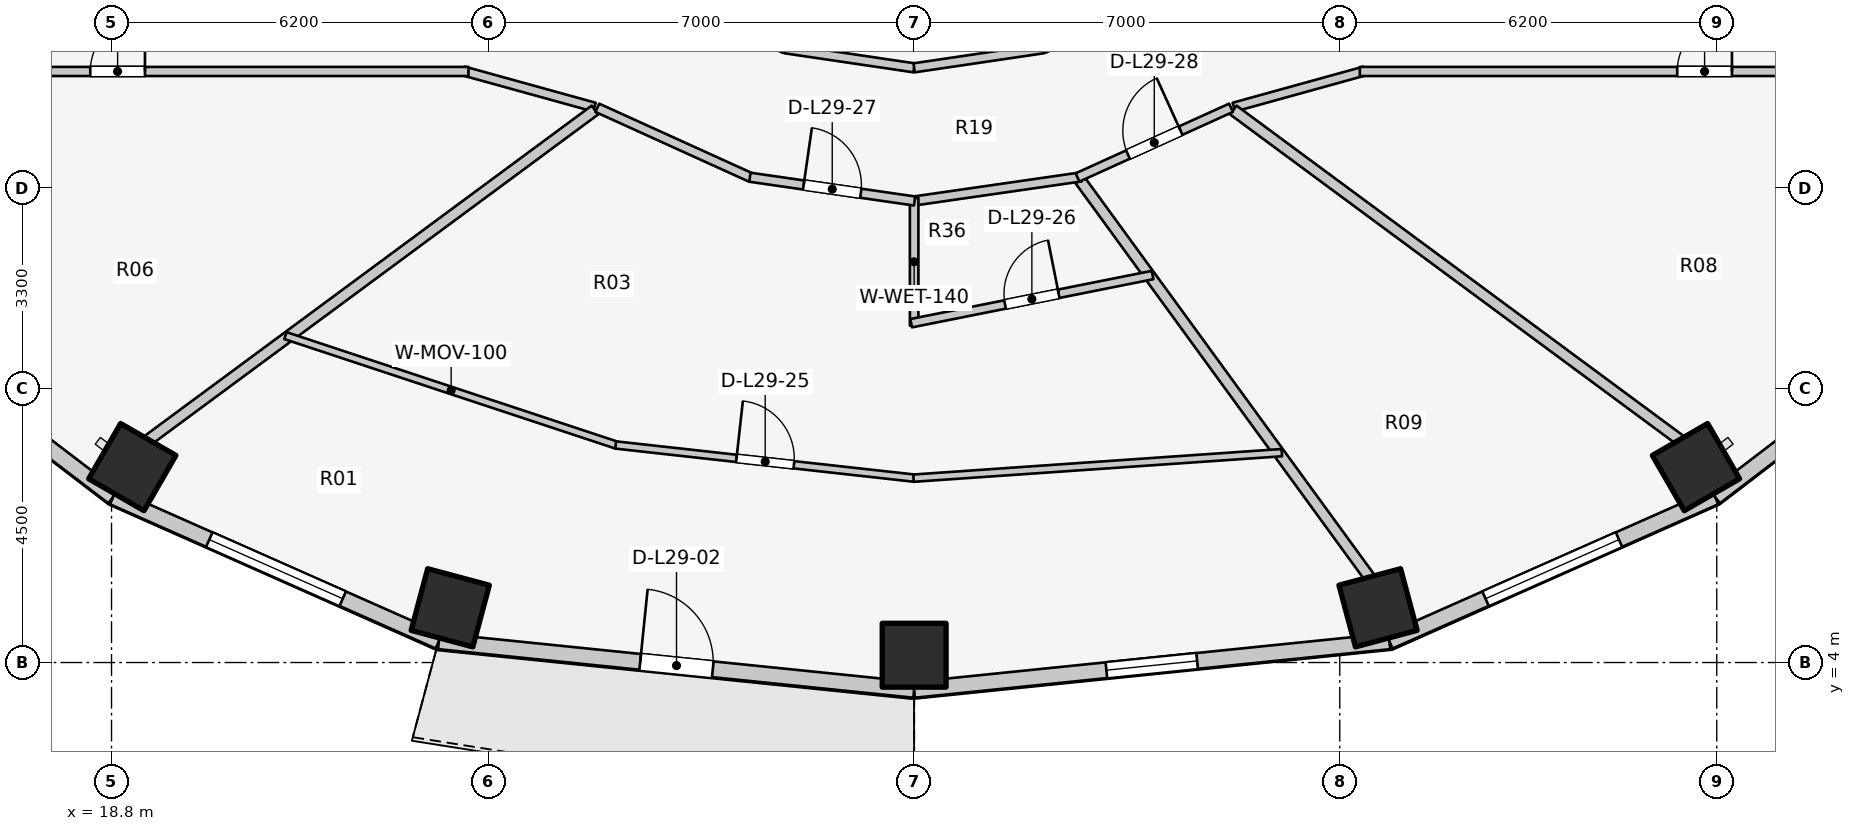
"""IFC4 building model, lengths in metres.
Left out: names, types, materials, properties, quantities, classifications, styles, units other than length and angle.
Written with IfcOpenShell. Run it as: python <this file> out.ifc"""

import sys

from ifc_helpers import new_model, si_unit, direction, frame, frame_2d, origin, origin_2d, place, context, subcontext, project, spatial, rectangle, extrude, element, fill, save


model = new_model("IFC4")
c1 = context("Model", 3, precision=1e-05, world=origin(), true_north=direction((0.0, 1.0)))
c2 = subcontext(c1, "Body", "Model", "MODEL_VIEW")
j1 = project(units=[si_unit("LENGTHUNIT", "METRE"), si_unit("PLANEANGLEUNIT", "RADIAN")], contexts=[c1])
p1 = place(None, origin())
s1 = spatial("IfcSite", under=j1, at=p1, CompositionType="ELEMENT")
p2 = place(p1, origin())
s2 = spatial("IfcBuilding", under=s1, at=p2, CompositionType="ELEMENT")
p3 = place(p2, frame((0.0, 0.0, 98.0)))
s3 = spatial("IfcBuildingStorey", under=s2, at=p3, CompositionType="ELEMENT", Elevation=98.0)
for number, where, z_axis, x_axis in (
    (1, (19.142, 7.214, 0.0), (0.0, 0.0, 1.0), (-0.5, -0.866, 0.0)),
    (2, (24.371, 4.9, 0.0), (0.0, 0.0, 1.0), (-0.259, -0.966, 0.0)),
    (3, (32.0, 4.12, 0.0), (0.0, 0.0, 1.0), (0.0, -1.0, 0.0)),
    (4, (39.629, 4.9, 0.0), (0.0, 0.0, 1.0), (0.259, -0.966, 0.0)),
    (5, (44.858, 7.214, 0.0), (0.0, 0.0, 1.0), (0.5, -0.866, 0.0)),
):
    element("IfcColumn", number, at=place(p3, frame(where, z_axis=z_axis, x_axis=x_axis)), inside=s3, PredefinedType="COLUMN", context=c2, shape_type="SweptSolid", body=[
        extrude(rectangle(XDim=1.05, YDim=1.05, at=origin_2d()), origin(), (0.0, 0.0, 1.0), 3.1),
    ])
p4 = place(p3, frame((14.734, 9.847, 0.0), z_axis=(0.0, 0.0, 1.0), x_axis=(0.794809810864, -0.606858603427, 0.0)))
e6 = element("IfcWall", 6, at=p4, inside=s3, PredefinedType="STANDARD", context=c2, shape_type="SweptSolid", body=[
    extrude(rectangle(XDim=5.149, YDim=0.26, at=frame_2d((2.575, 0.0))), origin(), (0.0, 0.0, 1.0), 2.85),
])
p5 = place(p3, frame((18.827, 6.722, 0.0), z_axis=(0.0, 0.0, 1.0), x_axis=(0.914336605747, -0.404955023911, 0.0)))
e7 = element("IfcWall", 7, at=p5, inside=s3, PredefinedType="STANDARD", context=c2, shape_type="SweptSolid", body=[
    extrude(rectangle(XDim=5.859, YDim=0.26, at=frame_2d((2.929, 0.0))), origin(), (0.0, 0.0, 1.0), 2.85),
])
p6 = place(p5, frame((1.729, 0.0, 0.75)))
e8 = element("IfcOpeningElement", 8, at=p6, cuts=e7, PredefinedType="OPENING", context=c2, shape_type="SweptSolid", body=[
    extrude(rectangle(XDim=2.4, YDim=1.7, at=frame_2d((1.2, 0.85))), frame((0.0, 0.14, 0.0), z_axis=(0.0, -1.0, 0.0), x_axis=(1.0, 0.0, 0.0)), (0.0, 0.0, 1.0), 0.28),
])
p7 = place(p3, frame((24.184, 4.349, 0.0), z_axis=(0.0, 0.0, 1.0), x_axis=(0.994821390558, -0.101638579726, 0.0)))
e9 = element("IfcWall", 9, at=p7, inside=s3, PredefinedType="STANDARD", context=c2, shape_type="SweptSolid", body=[
    extrude(rectangle(XDim=7.857, YDim=0.26, at=frame_2d((3.929, 0.0))), origin(), (0.0, 0.0, 1.0), 2.88),
])
p8 = place(p7, frame((3.329, 0.0, 0.0)))
e10 = element("IfcOpeningElement", 10, at=p8, cuts=e9, PredefinedType="OPENING", context=c2, shape_type="SweptSolid", body=[
    extrude(rectangle(XDim=1.2, YDim=2.2, at=frame_2d((0.6, 1.1))), frame((0.0, 0.14, 0.0), z_axis=(0.0, -1.0, 0.0), x_axis=(1.0, 0.0, 0.0)), (0.0, 0.0, 1.0), 0.28),
])
p9 = place(p3, frame((32.0, 3.551, 0.0), z_axis=(0.0, 0.0, 1.0), x_axis=(0.994821390558, 0.101638579726, 0.0)))
e11 = element("IfcWall", 11, at=p9, inside=s3, PredefinedType="STANDARD", context=c2, shape_type="SweptSolid", body=[
    extrude(rectangle(XDim=7.857, YDim=0.26, at=frame_2d((3.929, 0.0))), origin(), (0.0, 0.0, 1.0), 2.85),
])
p10 = place(p9, frame((3.178, 0.0, 0.75)))
e12 = element("IfcOpeningElement", 12, at=p10, cuts=e11, PredefinedType="OPENING", context=c2, shape_type="SweptSolid", body=[
    extrude(rectangle(XDim=1.5, YDim=1.6, at=frame_2d((0.75, 0.8))), frame((0.0, 0.14, 0.0), z_axis=(0.0, -1.0, 0.0), x_axis=(1.0, 0.0, 0.0)), (0.0, 0.0, 1.0), 0.28),
])
p11 = place(p3, frame((39.816, 4.349, 0.0), z_axis=(0.0, 0.0, 1.0), x_axis=(0.914336605747, 0.404955023911, 0.0)))
e13 = element("IfcWall", 13, at=p11, inside=s3, PredefinedType="STANDARD", context=c2, shape_type="SweptSolid", body=[
    extrude(rectangle(XDim=5.859, YDim=0.26, at=frame_2d((2.929, 0.0))), origin(), (0.0, 0.0, 1.0), 2.85),
])
p12 = place(p11, frame((1.729, 0.0, 0.75)))
e14 = element("IfcOpeningElement", 14, at=p12, cuts=e13, PredefinedType="OPENING", context=c2, shape_type="SweptSolid", body=[
    extrude(rectangle(XDim=2.4, YDim=1.7, at=frame_2d((1.2, 0.85))), frame((0.0, 0.14, 0.0), z_axis=(0.0, -1.0, 0.0), x_axis=(1.0, 0.0, 0.0)), (0.0, 0.0, 1.0), 0.28),
])
p13 = place(p3, frame((45.173, 6.722, 0.0), z_axis=(0.0, 0.0, 1.0), x_axis=(0.794809810864, 0.606858603427, 0.0)))
e15 = element("IfcWall", 15, at=p13, inside=s3, PredefinedType="STANDARD", context=c2, shape_type="SweptSolid", body=[
    extrude(rectangle(XDim=5.149, YDim=0.26, at=frame_2d((2.575, 0.0))), origin(), (0.0, 0.0, 1.0), 2.85),
])
p14 = place(p3, frame((27.89, 15.015, 0.0), z_axis=(0.0, 0.0, 1.0), x_axis=(0.906943449489, -0.421252393975, 0.0)))
e16 = element("IfcWall", 16, at=p14, inside=s3, PredefinedType="PARTITIONING", context=c2, shape_type="SweptSolid", body=[
    extrude(rectangle(XDim=2.186, YDim=0.15, at=frame_2d((1.093, 0.0))), origin(), (0.0, 0.0, 1.0), 2.272),
])
for number, where, z_axis, x_axis in (
    (17, (29.873, 14.094, 0.0), (0.0, 0.0, 1.0), (0.989, -0.146, 0.0)),
    (18, (32.0, 13.78, 0.0), (0.0, 0.0, 1.0), (0.989, 0.146, 0.0)),
):
    element("IfcWall", number, at=place(p3, frame(where, z_axis=z_axis, x_axis=x_axis)), inside=s3, PredefinedType="PARTITIONING", context=c2, shape_type="SweptSolid", body=[
        extrude(rectangle(XDim=2.151, YDim=0.15, at=frame_2d((1.075, 0.0))), origin(), (0.0, 0.0, 1.0), 2.272),
    ])
p15 = place(p3, frame((34.127, 14.094, 0.0), z_axis=(0.0, 0.0, 1.0), x_axis=(0.906943449489, 0.421252393975, 0.0)))
e19 = element("IfcWall", 19, at=p15, inside=s3, PredefinedType="PARTITIONING", context=c2, shape_type="SweptSolid", body=[
    extrude(rectangle(XDim=2.186, YDim=0.15, at=frame_2d((1.093, 0.0))), origin(), (0.0, 0.0, 1.0), 2.272),
])
p16 = place(p3, frame((26.742, 13.133, 0.0), z_axis=(0.0, 0.0, 1.0), x_axis=(-0.963833843713, 0.266503886865, 0.0)))
e20 = element("IfcWall", 20, at=p16, inside=s3, PredefinedType="PARTITIONING", context=c2, shape_type="SweptSolid", body=[
    extrude(rectangle(XDim=2.232, YDim=0.15, at=frame_2d((1.116, 0.0))), origin(), (0.0, 0.0, 1.0), 2.272),
])
p17 = place(p3, frame((17.15, 13.72, 0.0), z_axis=(0.0, 0.0, 1.0), x_axis=(1.0, 0.0, 0.0)))
e21 = element("IfcWall", 21, at=p17, inside=s3, PredefinedType="PARTITIONING", context=c2, shape_type="SweptSolid", body=[
    extrude(rectangle(XDim=7.52, YDim=0.15, at=frame_2d((3.76, 0.0))), origin(), (0.0, 0.0, 1.0), 2.272),
])
p18 = place(p17, frame((1.3, 0.0, 0.0)))
e22 = element("IfcOpeningElement", 22, at=p18, cuts=e21, PredefinedType="OPENING", context=c2, shape_type="SweptSolid", body=[
    extrude(rectangle(XDim=0.9, YDim=2.1, at=frame_2d((0.45, 1.05))), frame((0.0, 0.085, 0.0), z_axis=(0.0, -1.0, 0.0), x_axis=(1.0, 0.0, 0.0)), (0.0, 0.0, 1.0), 0.17),
])
p19 = place(p3, frame((37.258, 13.133, 0.0), z_axis=(0.0, 0.0, 1.0), x_axis=(0.963833843713, 0.266503886865, 0.0)))
e23 = element("IfcWall", 23, at=p19, inside=s3, PredefinedType="PARTITIONING", context=c2, shape_type="SweptSolid", body=[
    extrude(rectangle(XDim=2.232, YDim=0.15, at=frame_2d((1.116, 0.0))), origin(), (0.0, 0.0, 1.0), 2.272),
])
p20 = place(p3, frame((39.33, 13.72, 0.0), z_axis=(0.0, 0.0, 1.0), x_axis=(1.0, 0.0, 0.0)))
e24 = element("IfcWall", 24, at=p20, inside=s3, PredefinedType="PARTITIONING", context=c2, shape_type="SweptSolid", body=[
    extrude(rectangle(XDim=7.52, YDim=0.15, at=frame_2d((3.76, 0.0))), origin(), (0.0, 0.0, 1.0), 2.272),
])
p21 = place(p20, frame((5.22, 0.0, 0.0)))
e25 = element("IfcOpeningElement", 25, at=p21, cuts=e24, PredefinedType="OPENING", context=c2, shape_type="SweptSolid", body=[
    extrude(rectangle(XDim=0.9, YDim=2.1, at=frame_2d((0.45, 1.05))), frame((0.0, 0.085, 0.0), z_axis=(0.0, -1.0, 0.0), x_axis=(1.0, 0.0, 0.0)), (0.0, 0.0, 1.0), 0.17),
])
p22 = place(p3, frame((26.751, 13.086, 0.0), z_axis=(0.0, 0.0, 1.0), x_axis=(-0.80430981394, -0.594210167533, 0.0)))
e26 = element("IfcWall", 26, at=p22, inside=s3, PredefinedType="PARTITIONING", context=c2, shape_type="SweptSolid", body=[
    extrude(rectangle(XDim=9.146, YDim=0.18, at=frame_2d((4.573, 0.0))), origin(), (0.0, 0.0, 1.0), 2.272),
])
p23 = place(p3, frame((34.727, 11.934, 0.0), z_axis=(0.0, 0.0, 1.0), x_axis=(0.589042211476, -0.808102266486, 0.0)))
e27 = element("IfcWall", 27, at=p23, inside=s3, PredefinedType="PARTITIONING", context=c2, shape_type="SweptSolid", body=[
    extrude(rectangle(XDim=8.101, YDim=0.18, at=frame_2d((4.051, 0.0))), origin(), (0.0, 0.0, 1.0), 2.272),
])
p24 = place(p3, frame((37.249, 13.086, 0.0), z_axis=(0.0, 0.0, 1.0), x_axis=(0.80430981394, -0.594210167533, 0.0)))
e28 = element("IfcWall", 28, at=p24, inside=s3, PredefinedType="PARTITIONING", context=c2, shape_type="SweptSolid", body=[
    extrude(rectangle(XDim=9.146, YDim=0.18, at=frame_2d((4.573, 0.0))), origin(), (0.0, 0.0, 1.0), 2.272),
])
p25 = place(p3, frame((21.66, 9.376, 0.0), z_axis=(0.0, 0.0, 1.0), x_axis=(0.949429126756, -0.313981421852, 0.0)))
e29 = element("IfcWall", 29, at=p25, inside=s3, PredefinedType="MOVABLE", context=c2, shape_type="SweptSolid", body=[
    extrude(rectangle(XDim=5.741, YDim=0.12, at=frame_2d((2.87, 0.0))), origin(), (0.0, 0.0, 1.0), 2.272),
])
p26 = place(p3, frame((27.091, 7.578, 0.0), z_axis=(0.0, 0.0, 1.0), x_axis=(0.993892154322, -0.110355722898, 0.0)))
e30 = element("IfcWall", 30, at=p26, inside=s3, PredefinedType="MOVABLE", context=c2, shape_type="SweptSolid", body=[
    extrude(rectangle(XDim=4.949, YDim=0.12, at=frame_2d((2.475, 0.0))), origin(), (0.0, 0.0, 1.0), 2.272),
])
p27 = place(p26, frame((2.0, 0.0, 0.0)))
e31 = element("IfcOpeningElement", 31, at=p27, cuts=e30, PredefinedType="OPENING", context=c2, shape_type="SweptSolid", body=[
    extrude(rectangle(XDim=0.95, YDim=2.1, at=frame_2d((0.475, 1.05))), frame((0.0, 0.07, 0.0), z_axis=(0.0, -1.0, 0.0), x_axis=(1.0, 0.0, 0.0)), (0.0, 0.0, 1.0), 0.14),
])
p28 = place(p3, frame((31.99, 7.032, 0.0), z_axis=(0.0, 0.0, 1.0), x_axis=(0.997605327057, 0.06916365684, 0.0)))
e32 = element("IfcWall", 32, at=p28, inside=s3, PredefinedType="MOVABLE", context=c2, shape_type="SweptSolid", body=[
    extrude(rectangle(XDim=6.072, YDim=0.12, at=frame_2d((3.036, 0.0))), origin(), (0.0, 0.0, 1.0), 2.272),
])
p29 = place(p3, frame((31.95, 11.583, 0.0), z_axis=(0.0, 0.0, 1.0), x_axis=(0.989761784218, 0.142729150844, 0.0)))
e33 = element("IfcWall", 33, at=p29, inside=s3, PredefinedType="PARTITIONING", context=c2, shape_type="SweptSolid", body=[
    extrude(rectangle(XDim=2.822, YDim=0.15, at=frame_2d((1.411, 0.0))), origin(), (0.0, 0.0, 1.0), 2.272),
])
p30 = place(p3, frame((32.0, 11.64, 0.0), z_axis=(0.0, 0.0, 1.0), x_axis=(0.0, -1.0, 0.0)))
e34 = element("IfcWall", 34, at=p30, inside=s3, PredefinedType="PLUMBINGWALL", context=c2, shape_type="SweptSolid", body=[
    extrude(rectangle(XDim=2.1, YDim=0.14, at=frame_2d((1.05, 0.0))), origin(), (0.0, 0.0, 1.0), 2.272),
])
p31 = place(p3, frame((31.951, 9.58, 0.0), z_axis=(0.0, 0.0, 1.0), x_axis=(0.980668708329, 0.195675457082, 0.0)))
e35 = element("IfcWall", 35, at=p31, inside=s3, PredefinedType="PLUMBINGWALL", context=c2, shape_type="SweptSolid", body=[
    extrude(rectangle(XDim=4.049, YDim=0.14, at=frame_2d((2.024, 0.0))), origin(), (0.0, 0.0, 1.0), 2.272),
])
p32 = place(p31, frame((1.574, 0.0, 0.0)))
e36 = element("IfcOpeningElement", 36, at=p32, cuts=e35, PredefinedType="OPENING", context=c2, shape_type="SweptSolid", body=[
    extrude(rectangle(XDim=0.9, YDim=2.1, at=frame_2d((0.45, 1.05))), frame((0.0, 0.08, 0.0), z_axis=(0.0, -1.0, 0.0), x_axis=(1.0, 0.0, 0.0)), (0.0, 0.0, 1.0), 0.16),
])
p33 = place(p3, frame((26.789, 13.123, 0.0), z_axis=(0.0, 0.0, 1.0), x_axis=(0.910568469686, -0.41335827319, 0.0)))
e37 = element("IfcWall", 37, at=p33, inside=s3, PredefinedType="PARTITIONING", context=c2, shape_type="SweptSolid", body=[
    extrude(rectangle(XDim=2.772, YDim=0.15, at=frame_2d((1.386, 0.0))), origin(), (0.0, 0.0, 1.0), 2.272),
])
p34 = place(p3, frame((29.299, 11.981, 0.0), z_axis=(0.0, 0.0, 1.0), x_axis=(0.989748682384, -0.142819976611, 0.0)))
e38 = element("IfcWall", 38, at=p34, inside=s3, PredefinedType="PARTITIONING", context=c2, shape_type="SweptSolid", body=[
    extrude(rectangle(XDim=2.737, YDim=0.15, at=frame_2d((1.368, 0.0))), origin(), (0.0, 0.0, 1.0), 2.272),
])
p35 = place(p34, frame((0.893, 0.0, 0.0)))
e39 = element("IfcOpeningElement", 39, at=p35, cuts=e38, PredefinedType="OPENING", context=c2, shape_type="SweptSolid", body=[
    extrude(rectangle(XDim=0.95, YDim=2.1, at=frame_2d((0.475, 1.05))), frame((0.0, 0.085, 0.0), z_axis=(0.0, -1.0, 0.0), x_axis=(1.0, 0.0, 0.0)), (0.0, 0.0, 1.0), 0.17),
])
p36 = place(p3, frame((34.687, 11.977, 0.0), z_axis=(0.0, 0.0, 1.0), x_axis=(0.910568469686, 0.41335827319, 0.0)))
e40 = element("IfcWall", 40, at=p36, inside=s3, PredefinedType="PARTITIONING", context=c2, shape_type="SweptSolid", body=[
    extrude(rectangle(XDim=2.772, YDim=0.15, at=frame_2d((1.386, 0.0))), origin(), (0.0, 0.0, 1.0), 2.272),
])
p37 = place(p36, frame((0.911, 0.0, 0.0)))
e41 = element("IfcOpeningElement", 41, at=p37, cuts=e40, PredefinedType="OPENING", context=c2, shape_type="SweptSolid", body=[
    extrude(rectangle(XDim=0.95, YDim=2.1, at=frame_2d((0.475, 1.05))), frame((0.0, 0.085, 0.0), z_axis=(0.0, -1.0, 0.0), x_axis=(1.0, 0.0, 0.0)), (0.0, 0.0, 1.0), 0.17),
])
p38 = place(p6, origin())
e42 = element("IfcWindow", 42, at=p38, inside=s3, PartitioningType="SINGLE_PANEL", PredefinedType="WINDOW", context=c2, shape_type="SweptSolid", body=[
    extrude(rectangle(XDim=2.4, YDim=1.7, at=frame_2d((1.2, 0.85))), frame((0.0, 0.03, 0.0), z_axis=(0.0, -1.0, 0.0), x_axis=(1.0, 0.0, 0.0)), (0.0, 0.0, 1.0), 0.06),
])
fill(e8, e42)
p39 = place(p8, origin())
e43 = element("IfcDoor", 43, at=p39, inside=s3, OperationType="SINGLE_SWING_LEFT", PredefinedType="DOOR", context=c2, shape_type="SweptSolid", body=[
    extrude(rectangle(XDim=1.2, YDim=2.2, at=frame_2d((0.6, 1.1))), frame((0.0, 0.025, 0.0), z_axis=(0.0, -1.0, 0.0), x_axis=(1.0, 0.0, 0.0)), (0.0, 0.0, 1.0), 0.05),
])
fill(e10, e43)
p40 = place(p10, origin())
e44 = element("IfcWindow", 44, at=p40, inside=s3, PartitioningType="SINGLE_PANEL", PredefinedType="WINDOW", context=c2, shape_type="SweptSolid", body=[
    extrude(rectangle(XDim=1.5, YDim=1.6, at=frame_2d((0.75, 0.8))), frame((0.0, 0.03, 0.0), z_axis=(0.0, -1.0, 0.0), x_axis=(1.0, 0.0, 0.0)), (0.0, 0.0, 1.0), 0.06),
])
fill(e12, e44)
p41 = place(p12, origin())
e45 = element("IfcWindow", 45, at=p41, inside=s3, PartitioningType="SINGLE_PANEL", PredefinedType="WINDOW", context=c2, shape_type="SweptSolid", body=[
    extrude(rectangle(XDim=2.4, YDim=1.7, at=frame_2d((1.2, 0.85))), frame((0.0, 0.03, 0.0), z_axis=(0.0, -1.0, 0.0), x_axis=(1.0, 0.0, 0.0)), (0.0, 0.0, 1.0), 0.06),
])
fill(e14, e45)
p42 = place(p18, origin())
e46 = element("IfcDoor", 46, at=p42, inside=s3, OperationType="SINGLE_SWING_RIGHT", PredefinedType="DOOR", context=c2, shape_type="SweptSolid", body=[
    extrude(rectangle(XDim=0.9, YDim=2.1, at=frame_2d((0.45, 1.05))), frame((0.0, 0.025, 0.0), z_axis=(0.0, -1.0, 0.0), x_axis=(1.0, 0.0, 0.0)), (0.0, 0.0, 1.0), 0.05),
])
fill(e22, e46)
p43 = place(p21, origin())
e47 = element("IfcDoor", 47, at=p43, inside=s3, OperationType="SINGLE_SWING_RIGHT", PredefinedType="DOOR", context=c2, shape_type="SweptSolid", body=[
    extrude(rectangle(XDim=0.9, YDim=2.1, at=frame_2d((0.45, 1.05))), frame((0.0, 0.025, 0.0), z_axis=(0.0, -1.0, 0.0), x_axis=(1.0, 0.0, 0.0)), (0.0, 0.0, 1.0), 0.05),
])
fill(e25, e47)
p44 = place(p27, origin())
e48 = element("IfcDoor", 48, at=p44, inside=s3, OperationType="SINGLE_SWING_LEFT", PredefinedType="DOOR", context=c2, shape_type="SweptSolid", body=[
    extrude(rectangle(XDim=0.95, YDim=2.1, at=frame_2d((0.475, 1.05))), frame((0.0, 0.025, 0.0), z_axis=(0.0, -1.0, 0.0), x_axis=(1.0, 0.0, 0.0)), (0.0, 0.0, 1.0), 0.05),
])
fill(e31, e48)
p45 = place(p32, origin())
e49 = element("IfcDoor", 49, at=p45, inside=s3, OperationType="SINGLE_SWING_RIGHT", PredefinedType="DOOR", context=c2, shape_type="SweptSolid", body=[
    extrude(rectangle(XDim=0.9, YDim=2.1, at=frame_2d((0.45, 1.05))), frame((0.0, 0.025, 0.0), z_axis=(0.0, -1.0, 0.0), x_axis=(1.0, 0.0, 0.0)), (0.0, 0.0, 1.0), 0.05),
])
fill(e36, e49)
p46 = place(p35, origin())
e50 = element("IfcDoor", 50, at=p46, inside=s3, OperationType="SINGLE_SWING_LEFT", PredefinedType="DOOR", context=c2, shape_type="SweptSolid", body=[
    extrude(rectangle(XDim=0.95, YDim=2.1, at=frame_2d((0.475, 1.05))), frame((0.0, 0.025, 0.0), z_axis=(0.0, -1.0, 0.0), x_axis=(1.0, 0.0, 0.0)), (0.0, 0.0, 1.0), 0.05),
])
fill(e39, e50)
p47 = place(p37, origin())
e51 = element("IfcDoor", 51, at=p47, inside=s3, OperationType="SINGLE_SWING_RIGHT", PredefinedType="DOOR", context=c2, shape_type="SweptSolid", body=[
    extrude(rectangle(XDim=0.95, YDim=2.1, at=frame_2d((0.475, 1.05))), frame((0.0, 0.025, 0.0), z_axis=(0.0, -1.0, 0.0), x_axis=(1.0, 0.0, 0.0)), (0.0, 0.0, 1.0), 0.05),
])
fill(e41, e51)
save(model, sys.argv[1])
